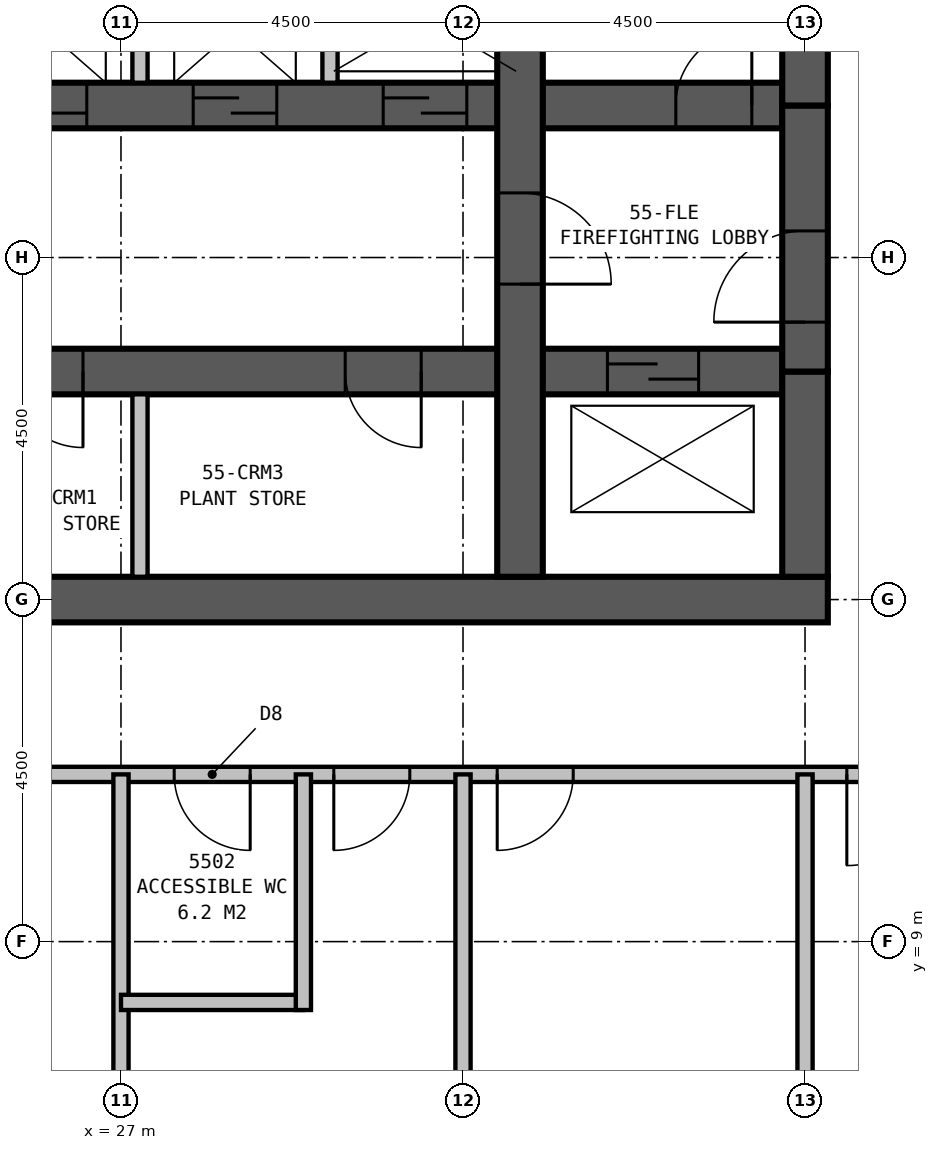
"""IFC4 building model, lengths in metres.
Left out: names, types, materials, properties, quantities, classifications, styles, units other than length and angle.
Written with IfcOpenShell. Run it as: python <this file> out.ifc"""

import sys

from ifc_helpers import new_model, si_unit, direction, frame, frame_2d, origin, place, context, subcontext, project, spatial, rectangle, extrude, element, fill, save


model = new_model("IFC4")
c1 = context("Model", 3, precision=1e-05, world=origin(), true_north=direction((0.0, 1.0)))
c2 = subcontext(c1, "Body", "Model", "MODEL_VIEW")
j1 = project(units=[si_unit("LENGTHUNIT", "METRE"), si_unit("PLANEANGLEUNIT", "RADIAN")], contexts=[c1])
p1 = place(None, origin())
s1 = spatial("IfcSite", under=j1, at=p1, CompositionType="ELEMENT")
p2 = place(p1, origin())
s2 = spatial("IfcBuilding", under=s1, at=p2, CompositionType="ELEMENT")
p3 = place(p2, frame((0.0, 0.0, 211.4)))
s3 = spatial("IfcBuildingStorey", under=s2, at=p3, CompositionType="ELEMENT", Elevation=211.4)
p4 = place(p3, frame((13.2, 13.5, 0.0), z_axis=(0.0, 0.0, 1.0), x_axis=(1.0, 0.0, 0.0)))
e1 = element("IfcWall", 1, at=p4, inside=s3, PredefinedType="SHEAR", context=c2, shape_type="SweptSolid", body=[
    extrude(rectangle(XDim=23.1, YDim=0.6, at=frame_2d((11.55, 0.0))), origin(), (0.0, 0.0, 1.0), 6.0),
])
p5 = place(p3, frame((32.25, 13.8, 0.0), z_axis=(0.0, 0.0, 1.0), x_axis=(0.0, 1.0, 0.0)))
e2 = element("IfcWall", 2, at=p5, inside=s3, PredefinedType="SHEAR", context=c2, shape_type="SweptSolid", body=[
    extrude(rectangle(XDim=12.9, YDim=0.6, at=frame_2d((6.45, 0.0))), origin(), (0.0, 0.0, 1.0), 6.0),
])
p6 = place(p5, frame((5.05, 0.0, 0.0), z_axis=(0.0, 0.0, 1.0), x_axis=(-1.0, 0.0, 0.0)))
e3 = element("IfcOpeningElement", 3, at=p6, cuts=e2, PredefinedType="OPENING", context=c2, shape_type="SweptSolid", body=[
    extrude(rectangle(XDim=1.2, YDim=2.1, at=frame_2d((0.6, 1.05))), frame((0.0, 0.31, 0.0), z_axis=(0.0, -1.0, 0.0), x_axis=(1.0, 0.0, 0.0)), (0.0, 0.0, 1.0), 0.62),
])
p7 = place(p3, frame((13.8, 16.5, 0.0), z_axis=(0.0, 0.0, 1.0), x_axis=(1.0, 0.0, 0.0)))
e4 = element("IfcWall", 4, at=p7, inside=s3, PredefinedType="SHEAR", context=c2, shape_type="SweptSolid", body=[
    extrude(rectangle(XDim=21.9, YDim=0.6, at=frame_2d((10.95, 0.0))), origin(), (0.0, 0.0, 1.0), 6.0),
])
p8 = place(p7, frame((5.75, 0.0, 0.0), z_axis=(0.0, 0.0, 1.0), x_axis=(-1.0, 0.0, 0.0)))
e5 = element("IfcOpeningElement", 5, at=p8, cuts=e4, PredefinedType="OPENING", context=c2, shape_type="SweptSolid", body=[
    extrude(rectangle(XDim=1.0, YDim=2.1, at=frame_2d((0.5, 1.05))), frame((0.0, 0.31, 0.0), z_axis=(0.0, -1.0, 0.0), x_axis=(1.0, 0.0, 0.0)), (0.0, 0.0, 1.0), 0.62),
])
p9 = place(p7, frame((10.2, 0.0, 0.0), z_axis=(0.0, 0.0, 1.0), x_axis=(-1.0, 0.0, 0.0)))
e6 = element("IfcOpeningElement", 6, at=p9, cuts=e4, PredefinedType="OPENING", context=c2, shape_type="SweptSolid", body=[
    extrude(rectangle(XDim=1.0, YDim=2.1, at=frame_2d((0.5, 1.05))), frame((0.0, 0.31, 0.0), z_axis=(0.0, -1.0, 0.0), x_axis=(1.0, 0.0, 0.0)), (0.0, 0.0, 1.0), 0.62),
])
p10 = place(p7, frame((12.7, 0.0, 0.0), z_axis=(0.0, 0.0, 1.0), x_axis=(-1.0, 0.0, 0.0)))
e7 = element("IfcOpeningElement", 7, at=p10, cuts=e4, PredefinedType="OPENING", context=c2, shape_type="SweptSolid", body=[
    extrude(rectangle(XDim=1.0, YDim=2.1, at=frame_2d((0.5, 1.05))), frame((0.0, 0.31, 0.0), z_axis=(0.0, -1.0, 0.0), x_axis=(1.0, 0.0, 0.0)), (0.0, 0.0, 1.0), 0.62),
])
p11 = place(p7, frame((17.15, 0.0, 0.0), z_axis=(0.0, 0.0, 1.0), x_axis=(-1.0, 0.0, 0.0)))
e8 = element("IfcOpeningElement", 8, at=p11, cuts=e4, PredefinedType="OPENING", context=c2, shape_type="SweptSolid", body=[
    extrude(rectangle(XDim=1.0, YDim=2.1, at=frame_2d((0.5, 1.05))), frame((0.0, 0.31, 0.0), z_axis=(0.0, -1.0, 0.0), x_axis=(1.0, 0.0, 0.0)), (0.0, 0.0, 1.0), 0.62),
])
p12 = place(p7, frame((0.6, 0.0, 0.0)))
e9 = element("IfcOpeningElement", 9, at=p12, cuts=e4, PredefinedType="OPENING", context=c2, shape_type="SweptSolid", body=[
    extrude(rectangle(XDim=1.2, YDim=2.1, at=frame_2d((0.6, 1.05))), frame((0.0, 0.31, 0.0), z_axis=(0.0, -1.0, 0.0), x_axis=(1.0, 0.0, 0.0)), (0.0, 0.0, 1.0), 0.62),
])
p13 = place(p7, frame((19.6, 0.0, 0.0)))
e10 = element("IfcOpeningElement", 10, at=p13, cuts=e4, PredefinedType="OPENING", context=c2, shape_type="SweptSolid", body=[
    extrude(rectangle(XDim=1.2, YDim=2.1, at=frame_2d((0.6, 1.05))), frame((0.0, 0.31, 0.0), z_axis=(0.0, -1.0, 0.0), x_axis=(1.0, 0.0, 0.0)), (0.0, 0.0, 1.0), 0.62),
])
p14 = place(p3, frame((13.8, 20.0, 0.0), z_axis=(0.0, 0.0, 1.0), x_axis=(1.0, 0.0, 0.0)))
e11 = element("IfcWall", 11, at=p14, inside=s3, PredefinedType="SHEAR", context=c2, shape_type="SweptSolid", body=[
    extrude(rectangle(XDim=21.9, YDim=0.6, at=frame_2d((10.95, 0.0))), origin(), (0.0, 0.0, 1.0), 6.0),
])
p15 = place(p14, frame((0.5, 0.0, 0.0)))
e12 = element("IfcOpeningElement", 12, at=p15, cuts=e11, PredefinedType="OPENING", context=c2, shape_type="SweptSolid", body=[
    extrude(rectangle(XDim=1.0, YDim=2.1, at=frame_2d((0.5, 1.05))), frame((0.0, 0.31, 0.0), z_axis=(0.0, -1.0, 0.0), x_axis=(1.0, 0.0, 0.0)), (0.0, 0.0, 1.0), 0.62),
])
p16 = place(p14, frame((20.5, 0.0, 0.0)))
e13 = element("IfcOpeningElement", 13, at=p16, cuts=e11, PredefinedType="OPENING", context=c2, shape_type="SweptSolid", body=[
    extrude(rectangle(XDim=1.0, YDim=2.1, at=frame_2d((0.5, 1.05))), frame((0.0, 0.31, 0.0), z_axis=(0.0, -1.0, 0.0), x_axis=(1.0, 0.0, 0.0)), (0.0, 0.0, 1.0), 0.62),
])
p17 = place(p14, frame((9.15, 0.0, 0.0)))
e14 = element("IfcOpeningElement", 14, at=p17, cuts=e11, PredefinedType="OPENING", context=c2, shape_type="SweptSolid", body=[
    extrude(rectangle(XDim=1.1, YDim=2.1, at=frame_2d((0.55, 1.05))), frame((0.0, 0.31, 0.0), z_axis=(0.0, -1.0, 0.0), x_axis=(1.0, 0.0, 0.0)), (0.0, 0.0, 1.0), 0.62),
])
p18 = place(p14, frame((11.65, 0.0, 0.0)))
e15 = element("IfcOpeningElement", 15, at=p18, cuts=e11, PredefinedType="OPENING", context=c2, shape_type="SweptSolid", body=[
    extrude(rectangle(XDim=1.1, YDim=2.1, at=frame_2d((0.55, 1.05))), frame((0.0, 0.31, 0.0), z_axis=(0.0, -1.0, 0.0), x_axis=(1.0, 0.0, 0.0)), (0.0, 0.0, 1.0), 0.62),
])
p19 = place(p14, frame((14.15, 0.0, 0.0)))
e16 = element("IfcOpeningElement", 16, at=p19, cuts=e11, PredefinedType="OPENING", context=c2, shape_type="SweptSolid", body=[
    extrude(rectangle(XDim=1.1, YDim=2.1, at=frame_2d((0.55, 1.05))), frame((0.0, 0.31, 0.0), z_axis=(0.0, -1.0, 0.0), x_axis=(1.0, 0.0, 0.0)), (0.0, 0.0, 1.0), 0.62),
])
p20 = place(p14, frame((16.65, 0.0, 0.0)))
e17 = element("IfcOpeningElement", 17, at=p20, cuts=e11, PredefinedType="OPENING", context=c2, shape_type="SweptSolid", body=[
    extrude(rectangle(XDim=1.1, YDim=2.1, at=frame_2d((0.55, 1.05))), frame((0.0, 0.31, 0.0), z_axis=(0.0, -1.0, 0.0), x_axis=(1.0, 0.0, 0.0)), (0.0, 0.0, 1.0), 0.62),
])
p21 = place(p14, frame((4.75, 0.0, 0.0)))
e18 = element("IfcOpeningElement", 18, at=p21, cuts=e11, PredefinedType="OPENING", context=c2, shape_type="SweptSolid", body=[
    extrude(rectangle(XDim=1.0, YDim=2.1, at=frame_2d((0.5, 1.05))), frame((0.0, 0.31, 0.0), z_axis=(0.0, -1.0, 0.0), x_axis=(1.0, 0.0, 0.0)), (0.0, 0.0, 1.0), 0.62),
])
p22 = place(p14, frame((6.7, 0.0, 0.0)))
e19 = element("IfcOpeningElement", 19, at=p22, cuts=e11, PredefinedType="OPENING", context=c2, shape_type="SweptSolid", body=[
    extrude(rectangle(XDim=1.0, YDim=2.1, at=frame_2d((0.5, 1.05))), frame((0.0, 0.31, 0.0), z_axis=(0.0, -1.0, 0.0), x_axis=(1.0, 0.0, 0.0)), (0.0, 0.0, 1.0), 0.62),
])
p23 = place(p3, frame((36.0, 13.8, 0.0), z_axis=(0.0, 0.0, 1.0), x_axis=(0.0, 1.0, 0.0)))
e20 = element("IfcWall", 20, at=p23, inside=s3, PredefinedType="SHEAR", context=c2, shape_type="SweptSolid", body=[
    extrude(rectangle(XDim=2.7, YDim=0.6, at=frame_2d((1.35, 0.0))), origin(), (0.0, 0.0, 1.0), 6.0),
])
p24 = place(p3, frame((36.0, 16.5, 0.0), z_axis=(0.0, 0.0, 1.0), x_axis=(0.0, 1.0, 0.0)))
e21 = element("IfcWall", 21, at=p24, inside=s3, PredefinedType="SHEAR", context=c2, shape_type="SweptSolid", body=[
    extrude(rectangle(XDim=3.5, YDim=0.6, at=frame_2d((1.75, 0.0))), origin(), (0.0, 0.0, 1.0), 6.0),
])
p25 = place(p24, frame((0.65, 0.0, 0.0)))
e22 = element("IfcOpeningElement", 22, at=p25, cuts=e21, PredefinedType="OPENING", context=c2, shape_type="SweptSolid", body=[
    extrude(rectangle(XDim=1.2, YDim=2.1, at=frame_2d((0.6, 1.05))), frame((0.0, 0.31, 0.0), z_axis=(0.0, -1.0, 0.0), x_axis=(1.0, 0.0, 0.0)), (0.0, 0.0, 1.0), 0.62),
])
p26 = place(p3, frame((36.0, 20.0, 0.0), z_axis=(0.0, 0.0, 1.0), x_axis=(0.0, 1.0, 0.0)))
e23 = element("IfcWall", 23, at=p26, inside=s3, PredefinedType="SHEAR", context=c2, shape_type="SweptSolid", body=[
    extrude(rectangle(XDim=6.7, YDim=0.6, at=frame_2d((3.35, 0.0))), origin(), (0.0, 0.0, 1.0), 6.0),
])
p27 = place(p3, frame((11.2, 11.2, 0.0), z_axis=(0.0, 0.0, 1.0), x_axis=(1.0, 0.0, 0.0)))
e24 = element("IfcWall", 24, at=p27, inside=s3, PredefinedType="PARTITIONING", context=c2, shape_type="SweptSolid", body=[
    extrude(rectangle(XDim=27.1, YDim=0.2, at=frame_2d((13.55, 0.0))), origin(), (0.0, 0.0, 1.0), 5.75),
])
p28 = place(p27, frame((4.95, 0.0, 0.0), z_axis=(0.0, 0.0, 1.0), x_axis=(-1.0, 0.0, 0.0)))
e25 = element("IfcOpeningElement", 25, at=p28, cuts=e24, PredefinedType="OPENING", context=c2, shape_type="SweptSolid", body=[
    extrude(rectangle(XDim=1.8, YDim=2.4, at=frame_2d((0.9, 1.2))), frame((0.0, 0.11, 0.0), z_axis=(0.0, -1.0, 0.0), x_axis=(1.0, 0.0, 0.0)), (0.0, 0.0, 1.0), 0.22),
])
p29 = place(p27, frame((17.5, 0.0, 0.0), z_axis=(0.0, 0.0, 1.0), x_axis=(-1.0, 0.0, 0.0)))
e26 = element("IfcOpeningElement", 26, at=p29, cuts=e24, PredefinedType="OPENING", context=c2, shape_type="SweptSolid", body=[
    extrude(rectangle(XDim=1.0, YDim=2.1, at=frame_2d((0.5, 1.05))), frame((0.0, 0.11, 0.0), z_axis=(0.0, -1.0, 0.0), x_axis=(1.0, 0.0, 0.0)), (0.0, 0.0, 1.0), 0.22),
])
p30 = place(p27, frame((19.6, 0.0, 0.0), z_axis=(0.0, 0.0, 1.0), x_axis=(-1.0, 0.0, 0.0)))
e27 = element("IfcOpeningElement", 27, at=p30, cuts=e24, PredefinedType="OPENING", context=c2, shape_type="SweptSolid", body=[
    extrude(rectangle(XDim=1.0, YDim=2.1, at=frame_2d((0.5, 1.05))), frame((0.0, 0.11, 0.0), z_axis=(0.0, -1.0, 0.0), x_axis=(1.0, 0.0, 0.0)), (0.0, 0.0, 1.0), 0.22),
])
p31 = place(p27, frame((21.75, 0.0, 0.0), z_axis=(0.0, 0.0, 1.0), x_axis=(-1.0, 0.0, 0.0)))
e28 = element("IfcOpeningElement", 28, at=p31, cuts=e24, PredefinedType="OPENING", context=c2, shape_type="SweptSolid", body=[
    extrude(rectangle(XDim=1.0, YDim=2.1, at=frame_2d((0.5, 1.05))), frame((0.0, 0.11, 0.0), z_axis=(0.0, -1.0, 0.0), x_axis=(1.0, 0.0, 0.0)), (0.0, 0.0, 1.0), 0.22),
])
p32 = place(p27, frame((1.45, 0.0, 0.0), z_axis=(0.0, 0.0, 1.0), x_axis=(-1.0, 0.0, 0.0)))
e29 = element("IfcOpeningElement", 29, at=p32, cuts=e24, PredefinedType="OPENING", context=c2, shape_type="SweptSolid", body=[
    extrude(rectangle(XDim=1.0, YDim=2.1, at=frame_2d((0.5, 1.05))), frame((0.0, 0.11, 0.0), z_axis=(0.0, -1.0, 0.0), x_axis=(1.0, 0.0, 0.0)), (0.0, 0.0, 1.0), 0.22),
])
p33 = place(p27, frame((26.55, 0.0, 0.0), z_axis=(0.0, 0.0, 1.0), x_axis=(-1.0, 0.0, 0.0)))
e30 = element("IfcOpeningElement", 30, at=p33, cuts=e24, PredefinedType="OPENING", context=c2, shape_type="SweptSolid", body=[
    extrude(rectangle(XDim=1.2, YDim=2.1, at=frame_2d((0.6, 1.05))), frame((0.0, 0.11, 0.0), z_axis=(0.0, -1.0, 0.0), x_axis=(1.0, 0.0, 0.0)), (0.0, 0.0, 1.0), 0.22),
])
p34 = place(p3, frame((27.0, 11.2, 0.0), z_axis=(0.0, 0.0, 1.0), x_axis=(0.0, -1.0, 0.0)))
e31 = element("IfcWall", 31, at=p34, inside=s3, PredefinedType="PARTITIONING", context=c2, shape_type="SweptSolid", body=[
    extrude(rectangle(XDim=10.15, YDim=0.2, at=frame_2d((5.075, 0.0))), origin(), (0.0, 0.0, 1.0), 2.15),
])
for number, where, z_axis, x_axis in (
    (32, (31.5, 11.2, 0.0), (0.0, 0.0, 1.0), (0.0, -1.0, 0.0)),
    (33, (36.0, 11.2, 0.0), (0.0, 0.0, 1.0), (0.0, -1.0, 0.0)),
):
    element("IfcWall", number, at=place(p3, frame(where, z_axis=z_axis, x_axis=x_axis)), inside=s3, PredefinedType="PARTITIONING", context=c2, shape_type="SweptSolid", body=[
        extrude(rectangle(XDim=10.15, YDim=0.2, at=frame_2d((5.075, 0.0))), origin(), (0.0, 0.0, 1.0), 4.75),
    ])
p35 = place(p3, frame((29.4, 11.2, 0.0), z_axis=(0.0, 0.0, 1.0), x_axis=(0.0, -1.0, 0.0)))
e34 = element("IfcWall", 34, at=p35, inside=s3, PredefinedType="PARTITIONING", context=c2, shape_type="SweptSolid", body=[
    extrude(rectangle(XDim=3.1, YDim=0.2, at=frame_2d((1.55, 0.0))), origin(), (0.0, 0.0, 1.0), 5.75),
])
for number, where, z_axis, x_axis in (
    (35, (27.0, 8.2, 0.0), (0.0, 0.0, 1.0), (1.0, 0.0, 0.0)),
    (36, (27.25, 13.8, 0.0), (0.0, 0.0, 1.0), (0.0, 1.0, 0.0)),
):
    element("IfcWall", number, at=place(p3, frame(where, z_axis=z_axis, x_axis=x_axis)), inside=s3, PredefinedType="PARTITIONING", context=c2, shape_type="SweptSolid", body=[
        extrude(rectangle(XDim=2.4, YDim=0.2, at=frame_2d((1.2, 0.0))), origin(), (0.0, 0.0, 1.0), 5.75),
    ])
for number, where, z_axis, x_axis in (
    (37, (27.25, 20.3, 0.0), (0.0, 0.0, 1.0), (0.0, 1.0, 0.0)),
    (38, (29.75, 20.3, 0.0), (0.0, 0.0, 1.0), (0.0, 1.0, 0.0)),
):
    element("IfcWall", number, at=place(p3, frame(where, z_axis=z_axis, x_axis=x_axis)), inside=s3, PredefinedType="PARTITIONING", context=c2, shape_type="SweptSolid", body=[
        extrude(rectangle(XDim=3.1, YDim=0.2, at=frame_2d((1.55, 0.0))), origin(), (0.0, 0.0, 1.0), 5.75),
    ])
p36 = place(p29, origin())
e39 = element("IfcDoor", 39, at=p36, inside=s3, OperationType="SINGLE_SWING_LEFT", PredefinedType="DOOR", context=c2, shape_type="SweptSolid", body=[
    extrude(rectangle(XDim=1.0, YDim=2.1, at=frame_2d((0.5, 1.05))), frame((0.0, 0.025, 0.0), z_axis=(0.0, -1.0, 0.0), x_axis=(1.0, 0.0, 0.0)), (0.0, 0.0, 1.0), 0.05),
])
fill(e26, e39)
p37 = place(p30, origin())
e40 = element("IfcDoor", 40, at=p37, inside=s3, OperationType="SINGLE_SWING_RIGHT", PredefinedType="DOOR", context=c2, shape_type="SweptSolid", body=[
    extrude(rectangle(XDim=1.0, YDim=2.1, at=frame_2d((0.5, 1.05))), frame((0.0, 0.025, 0.0), z_axis=(0.0, -1.0, 0.0), x_axis=(1.0, 0.0, 0.0)), (0.0, 0.0, 1.0), 0.05),
])
fill(e27, e40)
p38 = place(p31, origin())
e41 = element("IfcDoor", 41, at=p38, inside=s3, OperationType="SINGLE_SWING_RIGHT", PredefinedType="DOOR", context=c2, shape_type="SweptSolid", body=[
    extrude(rectangle(XDim=1.0, YDim=2.1, at=frame_2d((0.5, 1.05))), frame((0.0, 0.025, 0.0), z_axis=(0.0, -1.0, 0.0), x_axis=(1.0, 0.0, 0.0)), (0.0, 0.0, 1.0), 0.05),
])
fill(e28, e41)
p39 = place(p33, origin())
e42 = element("IfcDoor", 42, at=p39, inside=s3, OperationType="SINGLE_SWING_RIGHT", PredefinedType="DOOR", context=c2, shape_type="SweptSolid", body=[
    extrude(rectangle(XDim=1.2, YDim=2.1, at=frame_2d((0.6, 1.05))), frame((0.0, 0.025, 0.0), z_axis=(0.0, -1.0, 0.0), x_axis=(1.0, 0.0, 0.0)), (0.0, 0.0, 1.0), 0.05),
])
fill(e30, e42)
p40 = place(p25, origin())
e43 = element("IfcDoor", 43, at=p40, inside=s3, OperationType="SINGLE_SWING_LEFT", PredefinedType="DOOR", context=c2, shape_type="SweptSolid", body=[
    extrude(rectangle(XDim=1.2, YDim=2.1, at=frame_2d((0.6, 1.05))), frame((0.0, 0.3, 0.0), z_axis=(0.0, -1.0, 0.0), x_axis=(1.0, 0.0, 0.0)), (0.0, 0.0, 1.0), 0.6),
])
fill(e22, e43)
p41 = place(p6, origin())
e44 = element("IfcDoor", 44, at=p41, inside=s3, OperationType="SINGLE_SWING_RIGHT", PredefinedType="DOOR", context=c2, shape_type="SweptSolid", body=[
    extrude(rectangle(XDim=1.2, YDim=2.1, at=frame_2d((0.6, 1.05))), frame((0.0, 0.3, 0.0), z_axis=(0.0, -1.0, 0.0), x_axis=(1.0, 0.0, 0.0)), (0.0, 0.0, 1.0), 0.6),
])
fill(e3, e44)
p42 = place(p16, origin())
e45 = element("IfcDoor", 45, at=p42, inside=s3, OperationType="SINGLE_SWING_RIGHT", PredefinedType="DOOR", context=c2, shape_type="SweptSolid", body=[
    extrude(rectangle(XDim=1.0, YDim=2.1, at=frame_2d((0.5, 1.05))), frame((0.0, 0.3, 0.0), z_axis=(0.0, -1.0, 0.0), x_axis=(1.0, 0.0, 0.0)), (0.0, 0.0, 1.0), 0.6),
])
fill(e13, e45)
p43 = place(p18, origin())
e46 = element("IfcDoor", 46, at=p43, inside=s3, OperationType="SLIDING_TO_LEFT", PredefinedType="DOOR", context=c2, shape_type="SweptSolid", body=[
    extrude(rectangle(XDim=1.1, YDim=2.1, at=frame_2d((0.55, 1.05))), frame((0.0, 0.3, 0.0), z_axis=(0.0, -1.0, 0.0), x_axis=(1.0, 0.0, 0.0)), (0.0, 0.0, 1.0), 0.6),
])
fill(e15, e46)
p44 = place(p19, origin())
e47 = element("IfcDoor", 47, at=p44, inside=s3, OperationType="SLIDING_TO_LEFT", PredefinedType="DOOR", context=c2, shape_type="SweptSolid", body=[
    extrude(rectangle(XDim=1.1, YDim=2.1, at=frame_2d((0.55, 1.05))), frame((0.0, 0.3, 0.0), z_axis=(0.0, -1.0, 0.0), x_axis=(1.0, 0.0, 0.0)), (0.0, 0.0, 1.0), 0.6),
])
fill(e16, e47)
p45 = place(p20, origin())
e48 = element("IfcDoor", 48, at=p45, inside=s3, OperationType="SLIDING_TO_LEFT", PredefinedType="DOOR", context=c2, shape_type="SweptSolid", body=[
    extrude(rectangle(XDim=1.1, YDim=2.1, at=frame_2d((0.55, 1.05))), frame((0.0, 0.3, 0.0), z_axis=(0.0, -1.0, 0.0), x_axis=(1.0, 0.0, 0.0)), (0.0, 0.0, 1.0), 0.6),
])
fill(e17, e48)
p46 = place(p10, origin())
e49 = element("IfcDoor", 49, at=p46, inside=s3, OperationType="SINGLE_SWING_LEFT", PredefinedType="DOOR", context=c2, shape_type="SweptSolid", body=[
    extrude(rectangle(XDim=1.0, YDim=2.1, at=frame_2d((0.5, 1.05))), frame((0.0, 0.3, 0.0), z_axis=(0.0, -1.0, 0.0), x_axis=(1.0, 0.0, 0.0)), (0.0, 0.0, 1.0), 0.6),
])
fill(e7, e49)
p47 = place(p11, origin())
e50 = element("IfcDoor", 50, at=p47, inside=s3, OperationType="SINGLE_SWING_LEFT", PredefinedType="DOOR", context=c2, shape_type="SweptSolid", body=[
    extrude(rectangle(XDim=1.0, YDim=2.1, at=frame_2d((0.5, 1.05))), frame((0.0, 0.3, 0.0), z_axis=(0.0, -1.0, 0.0), x_axis=(1.0, 0.0, 0.0)), (0.0, 0.0, 1.0), 0.6),
])
fill(e8, e50)
p48 = place(p13, origin())
e51 = element("IfcDoor", 51, at=p48, inside=s3, OperationType="SLIDING_TO_LEFT", PredefinedType="DOOR", context=c2, shape_type="SweptSolid", body=[
    extrude(rectangle(XDim=1.2, YDim=2.1, at=frame_2d((0.6, 1.05))), frame((0.0, 0.3, 0.0), z_axis=(0.0, -1.0, 0.0), x_axis=(1.0, 0.0, 0.0)), (0.0, 0.0, 1.0), 0.6),
])
fill(e10, e51)
save(model, sys.argv[1])
